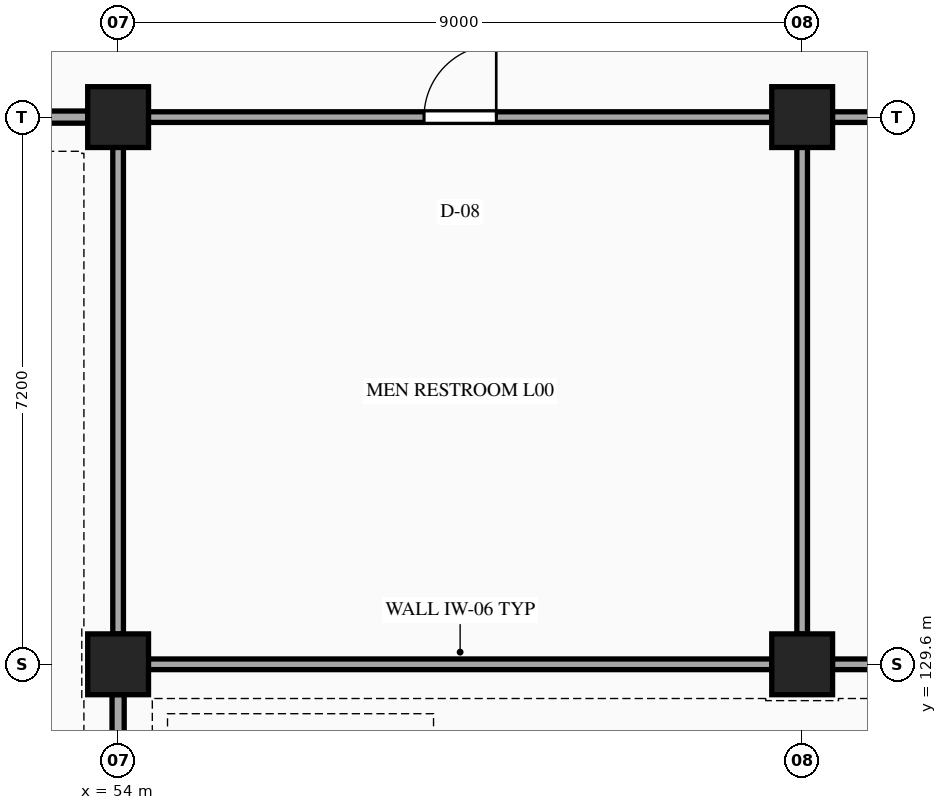
"""IFC4 building model, lengths in metres.
Left out: names, types, materials, properties, quantities, classifications, styles, units other than length and angle.
Written with IfcOpenShell. Run it as: python <this file> out.ifc"""

import sys

from ifc_helpers import new_model, si_unit, direction, frame, frame_2d, origin, origin_2d, place, context, subcontext, project, spatial, rectangle, extrude, element, fill, save


model = new_model("IFC4")
c1 = context("Model", 3, precision=1e-05, world=origin(), true_north=direction((0.0, 1.0)))
c2 = subcontext(c1, "Body", "Model", "MODEL_VIEW")
j1 = project(units=[si_unit("LENGTHUNIT", "METRE"), si_unit("PLANEANGLEUNIT", "RADIAN")], contexts=[c1])
p1 = place(None, origin())
s1 = spatial("IfcSite", under=j1, at=p1, CompositionType="ELEMENT")
p2 = place(p1, origin())
s2 = spatial("IfcBuilding", under=s1, at=p2, CompositionType="ELEMENT")
p3 = place(p2, origin())
s3 = spatial("IfcBuildingStorey", under=s2, at=p3, CompositionType="ELEMENT", Elevation=0.0)
for number, where, z_axis, x_axis in (
    (1, (54.0, 129.6, 0.0), (0.0, 0.0, 1.0), (1.0, 0.0, 0.0)),
    (2, (54.0, 136.8, 0.0), (0.0, 0.0, 1.0), (1.0, 0.0, 0.0)),
    (3, (63.0, 129.6, 0.0), (0.0, 0.0, 1.0), (1.0, 0.0, 0.0)),
    (4, (63.0, 136.8, 0.0), (0.0, 0.0, 1.0), (1.0, 0.0, 0.0)),
):
    element("IfcColumn", number, at=place(p3, frame(where, z_axis=z_axis, x_axis=x_axis)), inside=s3, PredefinedType="COLUMN", context=c2, shape_type="SweptSolid", body=[
        extrude(rectangle(XDim=0.8, YDim=0.8, at=origin_2d()), origin(), (0.0, 0.0, 1.0), 5.4),
    ])
for number, where, z_axis, x_axis in (
    (5, (54.398, 129.6, 0.0), (0.0, 0.0, 1.0), (1.0, 0.0, 0.0)),
    (6, (63.398, 129.6, 0.0), (0.0, 0.0, 1.0), (1.0, 0.0, 0.0)),
):
    element("IfcWall", number, at=place(p3, frame(where, z_axis=z_axis, x_axis=x_axis)), inside=s3, PredefinedType="PARTITIONING", context=c2, shape_type="SweptSolid", body=[
        extrude(rectangle(XDim=8.204, YDim=0.14, at=frame_2d((4.102, 0.0))), origin(), (0.0, 0.0, 1.0), 4.424),
    ])
p4 = place(p3, frame((45.398, 136.8, 0.0), z_axis=(0.0, 0.0, 1.0), x_axis=(1.0, 0.0, 0.0)))
e7 = element("IfcWall", 7, at=p4, inside=s3, PredefinedType="PARTITIONING", context=c2, shape_type="SweptSolid", body=[
    extrude(rectangle(XDim=8.204, YDim=0.16, at=frame_2d((4.102, 0.0))), origin(), (0.0, 0.0, 1.0), 4.424),
])
p5 = place(p4, frame((3.202, 0.0, 0.0)))
e8 = element("IfcOpeningElement", 8, at=p5, cuts=e7, PredefinedType="OPENING", context=c2, shape_type="SweptSolid", body=[
    extrude(rectangle(XDim=1.8, YDim=2.25, at=frame_2d((0.9, 1.125))), frame((0.0, 0.09, 0.0), z_axis=(0.0, -1.0, 0.0), x_axis=(1.0, 0.0, 0.0)), (0.0, 0.0, 1.0), 0.18),
])
p6 = place(p3, frame((54.398, 136.8, 0.0), z_axis=(0.0, 0.0, 1.0), x_axis=(1.0, 0.0, 0.0)))
e9 = element("IfcWall", 9, at=p6, inside=s3, PredefinedType="PARTITIONING", context=c2, shape_type="SweptSolid", body=[
    extrude(rectangle(XDim=8.204, YDim=0.14, at=frame_2d((4.102, 0.0))), origin(), (0.0, 0.0, 1.0), 4.424),
])
p7 = place(p6, frame((3.627, 0.0, 0.0)))
e10 = element("IfcOpeningElement", 10, at=p7, cuts=e9, PredefinedType="OPENING", context=c2, shape_type="SweptSolid", body=[
    extrude(rectangle(XDim=0.95, YDim=2.1, at=frame_2d((0.475, 1.05))), frame((0.0, 0.08, 0.0), z_axis=(0.0, -1.0, 0.0), x_axis=(1.0, 0.0, 0.0)), (0.0, 0.0, 1.0), 0.16),
])
p8 = place(p3, frame((63.398, 136.8, 0.0), z_axis=(0.0, 0.0, 1.0), x_axis=(1.0, 0.0, 0.0)))
e11 = element("IfcWall", 11, at=p8, inside=s3, PredefinedType="PARTITIONING", context=c2, shape_type="SweptSolid", body=[
    extrude(rectangle(XDim=8.204, YDim=0.14, at=frame_2d((4.102, 0.0))), origin(), (0.0, 0.0, 1.0), 4.424),
])
p9 = place(p8, frame((3.627, 0.0, 0.0)))
e12 = element("IfcOpeningElement", 12, at=p9, cuts=e11, PredefinedType="OPENING", context=c2, shape_type="SweptSolid", body=[
    extrude(rectangle(XDim=0.95, YDim=2.1, at=frame_2d((0.475, 1.05))), frame((0.0, 0.08, 0.0), z_axis=(0.0, -1.0, 0.0), x_axis=(1.0, 0.0, 0.0)), (0.0, 0.0, 1.0), 0.16),
])
p10 = place(p3, frame((54.0, 122.65, 0.0), z_axis=(0.0, 0.0, 1.0), x_axis=(0.0, 1.0, 0.0)))
e13 = element("IfcWall", 13, at=p10, inside=s3, PredefinedType="PARTITIONING", context=c2, shape_type="SweptSolid", body=[
    extrude(rectangle(XDim=6.552, YDim=0.16, at=frame_2d((3.276, 0.0))), origin(), (0.0, 0.0, 1.0), 4.424),
])
for number, where, z_axis, x_axis in (
    (14, (54.0, 129.998, 0.0), (0.0, 0.0, 1.0), (0.0, 1.0, 0.0)),
    (15, (63.0, 129.998, 0.0), (0.0, 0.0, 1.0), (0.0, 1.0, 0.0)),
):
    element("IfcWall", number, at=place(p3, frame(where, z_axis=z_axis, x_axis=x_axis)), inside=s3, PredefinedType="PARTITIONING", context=c2, shape_type="SweptSolid", body=[
        extrude(rectangle(XDim=6.404, YDim=0.14, at=frame_2d((3.202, 0.0))), origin(), (0.0, 0.0, 1.0), 4.437),
    ])
p11 = place(p7, origin())
e16 = element("IfcDoor", 16, at=p11, inside=s3, OperationType="SINGLE_SWING_RIGHT", PredefinedType="DOOR", context=c2, shape_type="SweptSolid", body=[
    extrude(rectangle(XDim=0.95, YDim=2.1, at=frame_2d((0.475, 1.05))), frame((0.0, 0.025, 0.0), z_axis=(0.0, -1.0, 0.0), x_axis=(1.0, 0.0, 0.0)), (0.0, 0.0, 1.0), 0.05),
])
fill(e10, e16)
save(model, sys.argv[1])
